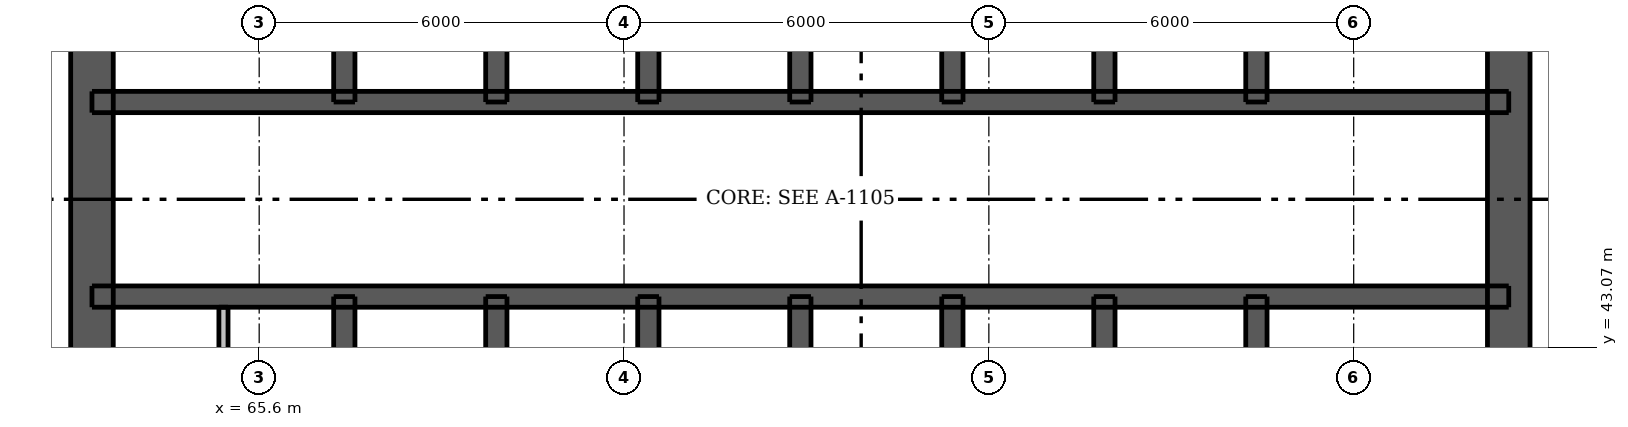
"""IFC4 building model, lengths in metres.
Left out: names, types, materials, properties, quantities, classifications, styles, units other than length and angle.
Written with IfcOpenShell. Run it as: python <this file> out.ifc"""

import sys

from ifc_helpers import new_model, si_unit, direction, frame, frame_2d, origin, place, context, subcontext, project, spatial, rectangle, extrude, element, fill, save


model = new_model("IFC4")
c1 = context("Model", 3, precision=1e-05, world=origin(), true_north=direction((0.0, 1.0)))
c2 = subcontext(c1, "Body", "Model", "MODEL_VIEW")
j1 = project(units=[si_unit("LENGTHUNIT", "METRE"), si_unit("PLANEANGLEUNIT", "RADIAN")], contexts=[c1])
p1 = place(None, origin())
s1 = spatial("IfcSite", under=j1, at=p1, CompositionType="ELEMENT")
p2 = place(p1, origin())
s2 = spatial("IfcBuilding", under=s1, at=p2, CompositionType="ELEMENT")
p3 = place(p2, frame((0.0, 0.0, 168.1)))
s3 = spatial("IfcBuildingStorey", under=s2, at=p3, CompositionType="ELEMENT", Elevation=168.1)
p4 = place(p3, frame((62.85, 33.5, 0.0), z_axis=(0.0, 0.0, 1.0), x_axis=(0.0, 1.0, 0.0)))
e1 = element("IfcWall", 1, at=p4, inside=s3, PredefinedType="SHEAR", context=c2, shape_type="SweptSolid", body=[
    extrude(rectangle(XDim=24.0, YDim=0.7, at=frame_2d((12.0, 0.0))), origin(), (0.0, 0.0, 1.0), 3.05),
])
p5 = place(p4, frame((11.2, 0.0, 0.0)))
e2 = element("IfcOpeningElement", 2, at=p5, cuts=e1, PredefinedType="OPENING", context=c2, shape_type="SweptSolid", body=[
    extrude(rectangle(XDim=1.6, YDim=2.1, at=frame_2d((0.8, 1.05))), frame((0.0, 0.36, 0.0), z_axis=(0.0, -1.0, 0.0), x_axis=(1.0, 0.0, 0.0)), (0.0, 0.0, 1.0), 0.72),
])
p6 = place(p3, frame((86.15, 33.5, 0.0), z_axis=(0.0, 0.0, 1.0), x_axis=(0.0, 1.0, 0.0)))
e3 = element("IfcWall", 3, at=p6, inside=s3, PredefinedType="SHEAR", context=c2, shape_type="SweptSolid", body=[
    extrude(rectangle(XDim=24.0, YDim=0.7, at=frame_2d((12.0, 0.0))), origin(), (0.0, 0.0, 1.0), 3.05),
])
p7 = place(p6, frame((11.2, 0.0, 0.0)))
e4 = element("IfcOpeningElement", 4, at=p7, cuts=e3, PredefinedType="OPENING", context=c2, shape_type="SweptSolid", body=[
    extrude(rectangle(XDim=1.6, YDim=2.1, at=frame_2d((0.8, 1.05))), frame((0.0, 0.36, 0.0), z_axis=(0.0, -1.0, 0.0), x_axis=(1.0, 0.0, 0.0)), (0.0, 0.0, 1.0), 0.72),
])
p8 = place(p3, frame((62.85, 43.9, 0.0), z_axis=(0.0, 0.0, 1.0), x_axis=(1.0, 0.0, 0.0)))
e5 = element("IfcWall", 5, at=p8, inside=s3, PredefinedType="SHEAR", context=c2, shape_type="SweptSolid", body=[
    extrude(rectangle(XDim=23.3, YDim=0.35, at=frame_2d((11.65, 0.0))), origin(), (0.0, 0.0, 1.0), 3.05),
])
p9 = place(p8, frame((0.806, 0.0, 0.0)))
e6 = element("IfcOpeningElement", 6, at=p9, cuts=e5, PredefinedType="OPENING", context=c2, shape_type="SweptSolid", body=[
    extrude(rectangle(XDim=0.9, YDim=2.1, at=frame_2d((0.45, 1.05))), frame((0.0, 0.185, 0.0), z_axis=(0.0, -1.0, 0.0), x_axis=(1.0, 0.0, 0.0)), (0.0, 0.0, 1.0), 0.37),
])
p10 = place(p8, frame((2.619, 0.0, 0.0)))
e7 = element("IfcOpeningElement", 7, at=p10, cuts=e5, PredefinedType="OPENING", context=c2, shape_type="SweptSolid", body=[
    extrude(rectangle(XDim=0.9, YDim=2.1, at=frame_2d((0.45, 1.05))), frame((0.0, 0.185, 0.0), z_axis=(0.0, -1.0, 0.0), x_axis=(1.0, 0.0, 0.0)), (0.0, 0.0, 1.0), 0.37),
])
p11 = place(p8, frame((20.688, 0.0, 0.0)))
e8 = element("IfcOpeningElement", 8, at=p11, cuts=e5, PredefinedType="OPENING", context=c2, shape_type="SweptSolid", body=[
    extrude(rectangle(XDim=0.9, YDim=2.1, at=frame_2d((0.45, 1.05))), frame((0.0, 0.185, 0.0), z_axis=(0.0, -1.0, 0.0), x_axis=(1.0, 0.0, 0.0)), (0.0, 0.0, 1.0), 0.37),
])
p12 = place(p8, frame((7.45, 0.0, 0.0)))
e9 = element("IfcOpeningElement", 9, at=p12, cuts=e5, PredefinedType="OPENING", context=c2, shape_type="SweptSolid", body=[
    extrude(rectangle(XDim=0.9, YDim=2.1, at=frame_2d((0.45, 1.05))), frame((0.0, 0.185, 0.0), z_axis=(0.0, -1.0, 0.0), x_axis=(1.0, 0.0, 0.0)), (0.0, 0.0, 1.0), 0.37),
])
p13 = place(p8, frame((9.95, 0.0, 0.0)))
e10 = element("IfcOpeningElement", 10, at=p13, cuts=e5, PredefinedType="OPENING", context=c2, shape_type="SweptSolid", body=[
    extrude(rectangle(XDim=0.9, YDim=2.1, at=frame_2d((0.45, 1.05))), frame((0.0, 0.185, 0.0), z_axis=(0.0, -1.0, 0.0), x_axis=(1.0, 0.0, 0.0)), (0.0, 0.0, 1.0), 0.37),
])
p14 = place(p8, frame((14.95, 0.0, 0.0)))
e11 = element("IfcOpeningElement", 11, at=p14, cuts=e5, PredefinedType="OPENING", context=c2, shape_type="SweptSolid", body=[
    extrude(rectangle(XDim=0.9, YDim=2.1, at=frame_2d((0.45, 1.05))), frame((0.0, 0.185, 0.0), z_axis=(0.0, -1.0, 0.0), x_axis=(1.0, 0.0, 0.0)), (0.0, 0.0, 1.0), 0.37),
])
p15 = place(p8, frame((17.45, 0.0, 0.0)))
e12 = element("IfcOpeningElement", 12, at=p15, cuts=e5, PredefinedType="OPENING", context=c2, shape_type="SweptSolid", body=[
    extrude(rectangle(XDim=0.9, YDim=2.1, at=frame_2d((0.45, 1.05))), frame((0.0, 0.185, 0.0), z_axis=(0.0, -1.0, 0.0), x_axis=(1.0, 0.0, 0.0)), (0.0, 0.0, 1.0), 0.37),
])
p16 = place(p3, frame((62.85, 47.1, 0.0), z_axis=(0.0, 0.0, 1.0), x_axis=(1.0, 0.0, 0.0)))
e13 = element("IfcWall", 13, at=p16, inside=s3, PredefinedType="SHEAR", context=c2, shape_type="SweptSolid", body=[
    extrude(rectangle(XDim=23.3, YDim=0.35, at=frame_2d((11.65, 0.0))), origin(), (0.0, 0.0, 1.0), 3.05),
])
p17 = place(p16, frame((1.712, 0.0, 0.0)))
e14 = element("IfcOpeningElement", 14, at=p17, cuts=e13, PredefinedType="OPENING", context=c2, shape_type="SweptSolid", body=[
    extrude(rectangle(XDim=0.9, YDim=2.1, at=frame_2d((0.45, 1.05))), frame((0.0, 0.185, 0.0), z_axis=(0.0, -1.0, 0.0), x_axis=(1.0, 0.0, 0.0)), (0.0, 0.0, 1.0), 0.37),
])
p18 = place(p16, frame((20.688, 0.0, 0.0)))
e15 = element("IfcOpeningElement", 15, at=p18, cuts=e13, PredefinedType="OPENING", context=c2, shape_type="SweptSolid", body=[
    extrude(rectangle(XDim=0.9, YDim=2.1, at=frame_2d((0.45, 1.05))), frame((0.0, 0.185, 0.0), z_axis=(0.0, -1.0, 0.0), x_axis=(1.0, 0.0, 0.0)), (0.0, 0.0, 1.0), 0.37),
])
p19 = place(p16, frame((4.85, 0.0, 0.0)))
e16 = element("IfcOpeningElement", 16, at=p19, cuts=e13, PredefinedType="OPENING", context=c2, shape_type="SweptSolid", body=[
    extrude(rectangle(XDim=1.1, YDim=2.1, at=frame_2d((0.55, 1.05))), frame((0.0, 0.185, 0.0), z_axis=(0.0, -1.0, 0.0), x_axis=(1.0, 0.0, 0.0)), (0.0, 0.0, 1.0), 0.37),
])
p20 = place(p16, frame((7.35, 0.0, 0.0)))
e17 = element("IfcOpeningElement", 17, at=p20, cuts=e13, PredefinedType="OPENING", context=c2, shape_type="SweptSolid", body=[
    extrude(rectangle(XDim=1.1, YDim=2.1, at=frame_2d((0.55, 1.05))), frame((0.0, 0.185, 0.0), z_axis=(0.0, -1.0, 0.0), x_axis=(1.0, 0.0, 0.0)), (0.0, 0.0, 1.0), 0.37),
])
p21 = place(p16, frame((9.85, 0.0, 0.0)))
e18 = element("IfcOpeningElement", 18, at=p21, cuts=e13, PredefinedType="OPENING", context=c2, shape_type="SweptSolid", body=[
    extrude(rectangle(XDim=1.1, YDim=2.1, at=frame_2d((0.55, 1.05))), frame((0.0, 0.185, 0.0), z_axis=(0.0, -1.0, 0.0), x_axis=(1.0, 0.0, 0.0)), (0.0, 0.0, 1.0), 0.37),
])
p22 = place(p16, frame((12.35, 0.0, 0.0)))
e19 = element("IfcOpeningElement", 19, at=p22, cuts=e13, PredefinedType="OPENING", context=c2, shape_type="SweptSolid", body=[
    extrude(rectangle(XDim=1.1, YDim=2.1, at=frame_2d((0.55, 1.05))), frame((0.0, 0.185, 0.0), z_axis=(0.0, -1.0, 0.0), x_axis=(1.0, 0.0, 0.0)), (0.0, 0.0, 1.0), 0.37),
])
p23 = place(p16, frame((14.85, 0.0, 0.0)))
e20 = element("IfcOpeningElement", 20, at=p23, cuts=e13, PredefinedType="OPENING", context=c2, shape_type="SweptSolid", body=[
    extrude(rectangle(XDim=1.1, YDim=2.1, at=frame_2d((0.55, 1.05))), frame((0.0, 0.185, 0.0), z_axis=(0.0, -1.0, 0.0), x_axis=(1.0, 0.0, 0.0)), (0.0, 0.0, 1.0), 0.37),
])
p24 = place(p16, frame((17.35, 0.0, 0.0)))
e21 = element("IfcOpeningElement", 21, at=p24, cuts=e13, PredefinedType="OPENING", context=c2, shape_type="SweptSolid", body=[
    extrude(rectangle(XDim=1.1, YDim=2.1, at=frame_2d((0.55, 1.05))), frame((0.0, 0.185, 0.0), z_axis=(0.0, -1.0, 0.0), x_axis=(1.0, 0.0, 0.0)), (0.0, 0.0, 1.0), 0.37),
])
p25 = place(p3, frame((67.0, 33.85, 0.0), z_axis=(0.0, 0.0, 1.0), x_axis=(0.0, 1.0, 0.0)))
e22 = element("IfcWall", 22, at=p25, inside=s3, PredefinedType="SHEAR", context=c2, shape_type="SweptSolid", body=[
    extrude(rectangle(XDim=10.05, YDim=0.35, at=frame_2d((5.025, 0.0))), origin(), (0.0, 0.0, 1.0), 3.05),
])
p26 = place(p25, frame((0.55, 0.0, 0.0)))
e23 = element("IfcOpeningElement", 23, at=p26, cuts=e22, PredefinedType="OPENING", context=c2, shape_type="SweptSolid", body=[
    extrude(rectangle(XDim=1.1, YDim=2.1, at=frame_2d((0.55, 1.05))), frame((0.0, 0.185, 0.0), z_axis=(0.0, -1.0, 0.0), x_axis=(1.0, 0.0, 0.0)), (0.0, 0.0, 1.0), 0.37),
])
for number, where, z_axis, x_axis in (
    (24, (67.0, 47.1, 0.0), (0.0, 0.0, 1.0), (0.0, 1.0, 0.0)),
    (25, (82.0, 33.85, 0.0), (0.0, 0.0, 1.0), (0.0, 1.0, 0.0)),
    (26, (82.0, 47.1, 0.0), (0.0, 0.0, 1.0), (0.0, 1.0, 0.0)),
):
    element("IfcWall", number, at=place(p3, frame(where, z_axis=z_axis, x_axis=x_axis)), inside=s3, PredefinedType="SHEAR", context=c2, shape_type="SweptSolid", body=[
        extrude(rectangle(XDim=10.05, YDim=0.35, at=frame_2d((5.025, 0.0))), origin(), (0.0, 0.0, 1.0), 3.05),
    ])
for number, where, z_axis, x_axis in (
    (27, (69.5, 41.0, 0.0), (0.0, 0.0, 1.0), (0.0, 1.0, 0.0)),
    (28, (69.5, 47.1, 0.0), (0.0, 0.0, 1.0), (0.0, 1.0, 0.0)),
    (29, (72.0, 41.0, 0.0), (0.0, 0.0, 1.0), (0.0, 1.0, 0.0)),
    (30, (72.0, 47.1, 0.0), (0.0, 0.0, 1.0), (0.0, 1.0, 0.0)),
    (31, (74.5, 41.0, 0.0), (0.0, 0.0, 1.0), (0.0, 1.0, 0.0)),
    (32, (74.5, 47.1, 0.0), (0.0, 0.0, 1.0), (0.0, 1.0, 0.0)),
    (33, (77.0, 41.0, 0.0), (0.0, 0.0, 1.0), (0.0, 1.0, 0.0)),
    (34, (77.0, 47.1, 0.0), (0.0, 0.0, 1.0), (0.0, 1.0, 0.0)),
    (35, (79.5, 41.0, 0.0), (0.0, 0.0, 1.0), (0.0, 1.0, 0.0)),
    (36, (79.5, 47.1, 0.0), (0.0, 0.0, 1.0), (0.0, 1.0, 0.0)),
):
    element("IfcWall", number, at=place(p3, frame(where, z_axis=z_axis, x_axis=x_axis)), inside=s3, PredefinedType="SHEAR", context=c2, shape_type="SweptSolid", body=[
        extrude(rectangle(XDim=2.9, YDim=0.35, at=frame_2d((1.45, 0.0))), origin(), (0.0, 0.0, 1.0), 3.05),
    ])
p27 = place(p3, frame((65.012, 41.175, 0.0), z_axis=(0.0, 0.0, 1.0), x_axis=(0.0, 1.0, 0.0)))
e37 = element("IfcWall", 37, at=p27, inside=s3, PredefinedType="PLUMBINGWALL", context=c2, shape_type="SweptSolid", body=[
    extrude(rectangle(XDim=2.55, YDim=0.15, at=frame_2d((1.275, 0.0))), origin(), (0.0, 0.0, 1.0), 3.05),
])
p28 = place(p5, origin())
e38 = element("IfcDoor", 38, at=p28, inside=s3, OperationType="DOUBLE_DOOR_SINGLE_SWING", PredefinedType="DOOR", context=c2, shape_type="SweptSolid", body=[
    extrude(rectangle(XDim=1.6, YDim=2.1, at=frame_2d((0.8, 1.05))), frame((0.0, -0.288, 0.0), z_axis=(0.0, -1.0, 0.0), x_axis=(1.0, 0.0, 0.0)), (0.0, 0.0, 1.0), 0.05),
])
fill(e2, e38)
p29 = place(p7, origin())
e39 = element("IfcDoor", 39, at=p29, inside=s3, OperationType="DOUBLE_DOOR_SINGLE_SWING", PredefinedType="DOOR", context=c2, shape_type="SweptSolid", body=[
    extrude(rectangle(XDim=1.6, YDim=2.1, at=frame_2d((0.8, 1.05))), frame((0.0, 0.337, 0.0), z_axis=(0.0, -1.0, 0.0), x_axis=(1.0, 0.0, 0.0)), (0.0, 0.0, 1.0), 0.05),
])
fill(e4, e39)
p30 = place(p9, origin())
e40 = element("IfcDoor", 40, at=p30, inside=s3, OperationType="SINGLE_SWING_LEFT", PredefinedType="DOOR", context=c2, shape_type="SweptSolid", body=[
    extrude(rectangle(XDim=0.9, YDim=2.1, at=frame_2d((0.45, 1.05))), frame((0.0, -0.112, 0.0), z_axis=(0.0, -1.0, 0.0), x_axis=(1.0, 0.0, 0.0)), (0.0, 0.0, 1.0), 0.05),
])
fill(e6, e40)
p31 = place(p10, origin())
e41 = element("IfcDoor", 41, at=p31, inside=s3, OperationType="SINGLE_SWING_RIGHT", PredefinedType="DOOR", context=c2, shape_type="SweptSolid", body=[
    extrude(rectangle(XDim=0.9, YDim=2.1, at=frame_2d((0.45, 1.05))), frame((0.0, -0.112, 0.0), z_axis=(0.0, -1.0, 0.0), x_axis=(1.0, 0.0, 0.0)), (0.0, 0.0, 1.0), 0.05),
])
fill(e7, e41)
p32 = place(p11, origin())
e42 = element("IfcDoor", 42, at=p32, inside=s3, OperationType="SINGLE_SWING_LEFT", PredefinedType="DOOR", context=c2, shape_type="SweptSolid", body=[
    extrude(rectangle(XDim=0.9, YDim=2.1, at=frame_2d((0.45, 1.05))), frame((0.0, -0.112, 0.0), z_axis=(0.0, -1.0, 0.0), x_axis=(1.0, 0.0, 0.0)), (0.0, 0.0, 1.0), 0.05),
])
fill(e8, e42)
p33 = place(p17, origin())
e43 = element("IfcDoor", 43, at=p33, inside=s3, OperationType="SINGLE_SWING_LEFT", PredefinedType="DOOR", context=c2, shape_type="SweptSolid", body=[
    extrude(rectangle(XDim=0.9, YDim=2.1, at=frame_2d((0.45, 1.05))), frame((0.0, 0.163, 0.0), z_axis=(0.0, -1.0, 0.0), x_axis=(1.0, 0.0, 0.0)), (0.0, 0.0, 1.0), 0.05),
])
fill(e14, e43)
p34 = place(p18, origin())
e44 = element("IfcDoor", 44, at=p34, inside=s3, OperationType="SINGLE_SWING_LEFT", PredefinedType="DOOR", context=c2, shape_type="SweptSolid", body=[
    extrude(rectangle(XDim=0.9, YDim=2.1, at=frame_2d((0.45, 1.05))), frame((0.0, 0.163, 0.0), z_axis=(0.0, -1.0, 0.0), x_axis=(1.0, 0.0, 0.0)), (0.0, 0.0, 1.0), 0.05),
])
fill(e15, e44)
p35 = place(p12, origin())
e45 = element("IfcDoor", 45, at=p35, inside=s3, OperationType="SINGLE_SWING_LEFT", PredefinedType="DOOR", context=c2, shape_type="SweptSolid", body=[
    extrude(rectangle(XDim=0.9, YDim=2.1, at=frame_2d((0.45, 1.05))), frame((0.0, -0.112, 0.0), z_axis=(0.0, -1.0, 0.0), x_axis=(1.0, 0.0, 0.0)), (0.0, 0.0, 1.0), 0.05),
])
fill(e9, e45)
p36 = place(p13, origin())
e46 = element("IfcDoor", 46, at=p36, inside=s3, OperationType="SINGLE_SWING_RIGHT", PredefinedType="DOOR", context=c2, shape_type="SweptSolid", body=[
    extrude(rectangle(XDim=0.9, YDim=2.1, at=frame_2d((0.45, 1.05))), frame((0.0, -0.112, 0.0), z_axis=(0.0, -1.0, 0.0), x_axis=(1.0, 0.0, 0.0)), (0.0, 0.0, 1.0), 0.05),
])
fill(e10, e46)
p37 = place(p14, origin())
e47 = element("IfcDoor", 47, at=p37, inside=s3, OperationType="SINGLE_SWING_RIGHT", PredefinedType="DOOR", context=c2, shape_type="SweptSolid", body=[
    extrude(rectangle(XDim=0.9, YDim=2.1, at=frame_2d((0.45, 1.05))), frame((0.0, -0.112, 0.0), z_axis=(0.0, -1.0, 0.0), x_axis=(1.0, 0.0, 0.0)), (0.0, 0.0, 1.0), 0.05),
])
fill(e11, e47)
p38 = place(p15, origin())
e48 = element("IfcDoor", 48, at=p38, inside=s3, OperationType="SINGLE_SWING_LEFT", PredefinedType="DOOR", context=c2, shape_type="SweptSolid", body=[
    extrude(rectangle(XDim=0.9, YDim=2.1, at=frame_2d((0.45, 1.05))), frame((0.0, -0.112, 0.0), z_axis=(0.0, -1.0, 0.0), x_axis=(1.0, 0.0, 0.0)), (0.0, 0.0, 1.0), 0.05),
])
fill(e12, e48)
p39 = place(p19, origin())
e49 = element("IfcDoor", 49, at=p39, inside=s3, OperationType="DOUBLE_DOOR_SLIDING", PredefinedType="DOOR", context=c2, shape_type="SweptSolid", body=[
    extrude(rectangle(XDim=1.1, YDim=2.1, at=frame_2d((0.55, 1.05))), frame((0.0, 0.025, 0.0), z_axis=(0.0, -1.0, 0.0), x_axis=(1.0, 0.0, 0.0)), (0.0, 0.0, 1.0), 0.05),
])
fill(e16, e49)
p40 = place(p20, origin())
e50 = element("IfcDoor", 50, at=p40, inside=s3, OperationType="DOUBLE_DOOR_SLIDING", PredefinedType="DOOR", context=c2, shape_type="SweptSolid", body=[
    extrude(rectangle(XDim=1.1, YDim=2.1, at=frame_2d((0.55, 1.05))), frame((0.0, 0.025, 0.0), z_axis=(0.0, -1.0, 0.0), x_axis=(1.0, 0.0, 0.0)), (0.0, 0.0, 1.0), 0.05),
])
fill(e17, e50)
p41 = place(p21, origin())
e51 = element("IfcDoor", 51, at=p41, inside=s3, OperationType="DOUBLE_DOOR_SLIDING", PredefinedType="DOOR", context=c2, shape_type="SweptSolid", body=[
    extrude(rectangle(XDim=1.1, YDim=2.1, at=frame_2d((0.55, 1.05))), frame((0.0, 0.025, 0.0), z_axis=(0.0, -1.0, 0.0), x_axis=(1.0, 0.0, 0.0)), (0.0, 0.0, 1.0), 0.05),
])
fill(e18, e51)
p42 = place(p22, origin())
e52 = element("IfcDoor", 52, at=p42, inside=s3, OperationType="DOUBLE_DOOR_SLIDING", PredefinedType="DOOR", context=c2, shape_type="SweptSolid", body=[
    extrude(rectangle(XDim=1.1, YDim=2.1, at=frame_2d((0.55, 1.05))), frame((0.0, 0.025, 0.0), z_axis=(0.0, -1.0, 0.0), x_axis=(1.0, 0.0, 0.0)), (0.0, 0.0, 1.0), 0.05),
])
fill(e19, e52)
p43 = place(p23, origin())
e53 = element("IfcDoor", 53, at=p43, inside=s3, OperationType="DOUBLE_DOOR_SLIDING", PredefinedType="DOOR", context=c2, shape_type="SweptSolid", body=[
    extrude(rectangle(XDim=1.1, YDim=2.1, at=frame_2d((0.55, 1.05))), frame((0.0, 0.025, 0.0), z_axis=(0.0, -1.0, 0.0), x_axis=(1.0, 0.0, 0.0)), (0.0, 0.0, 1.0), 0.05),
])
fill(e20, e53)
p44 = place(p24, origin())
e54 = element("IfcDoor", 54, at=p44, inside=s3, OperationType="DOUBLE_DOOR_SLIDING", PredefinedType="DOOR", context=c2, shape_type="SweptSolid", body=[
    extrude(rectangle(XDim=1.1, YDim=2.1, at=frame_2d((0.55, 1.05))), frame((0.0, 0.025, 0.0), z_axis=(0.0, -1.0, 0.0), x_axis=(1.0, 0.0, 0.0)), (0.0, 0.0, 1.0), 0.05),
])
fill(e21, e54)
save(model, sys.argv[1])
